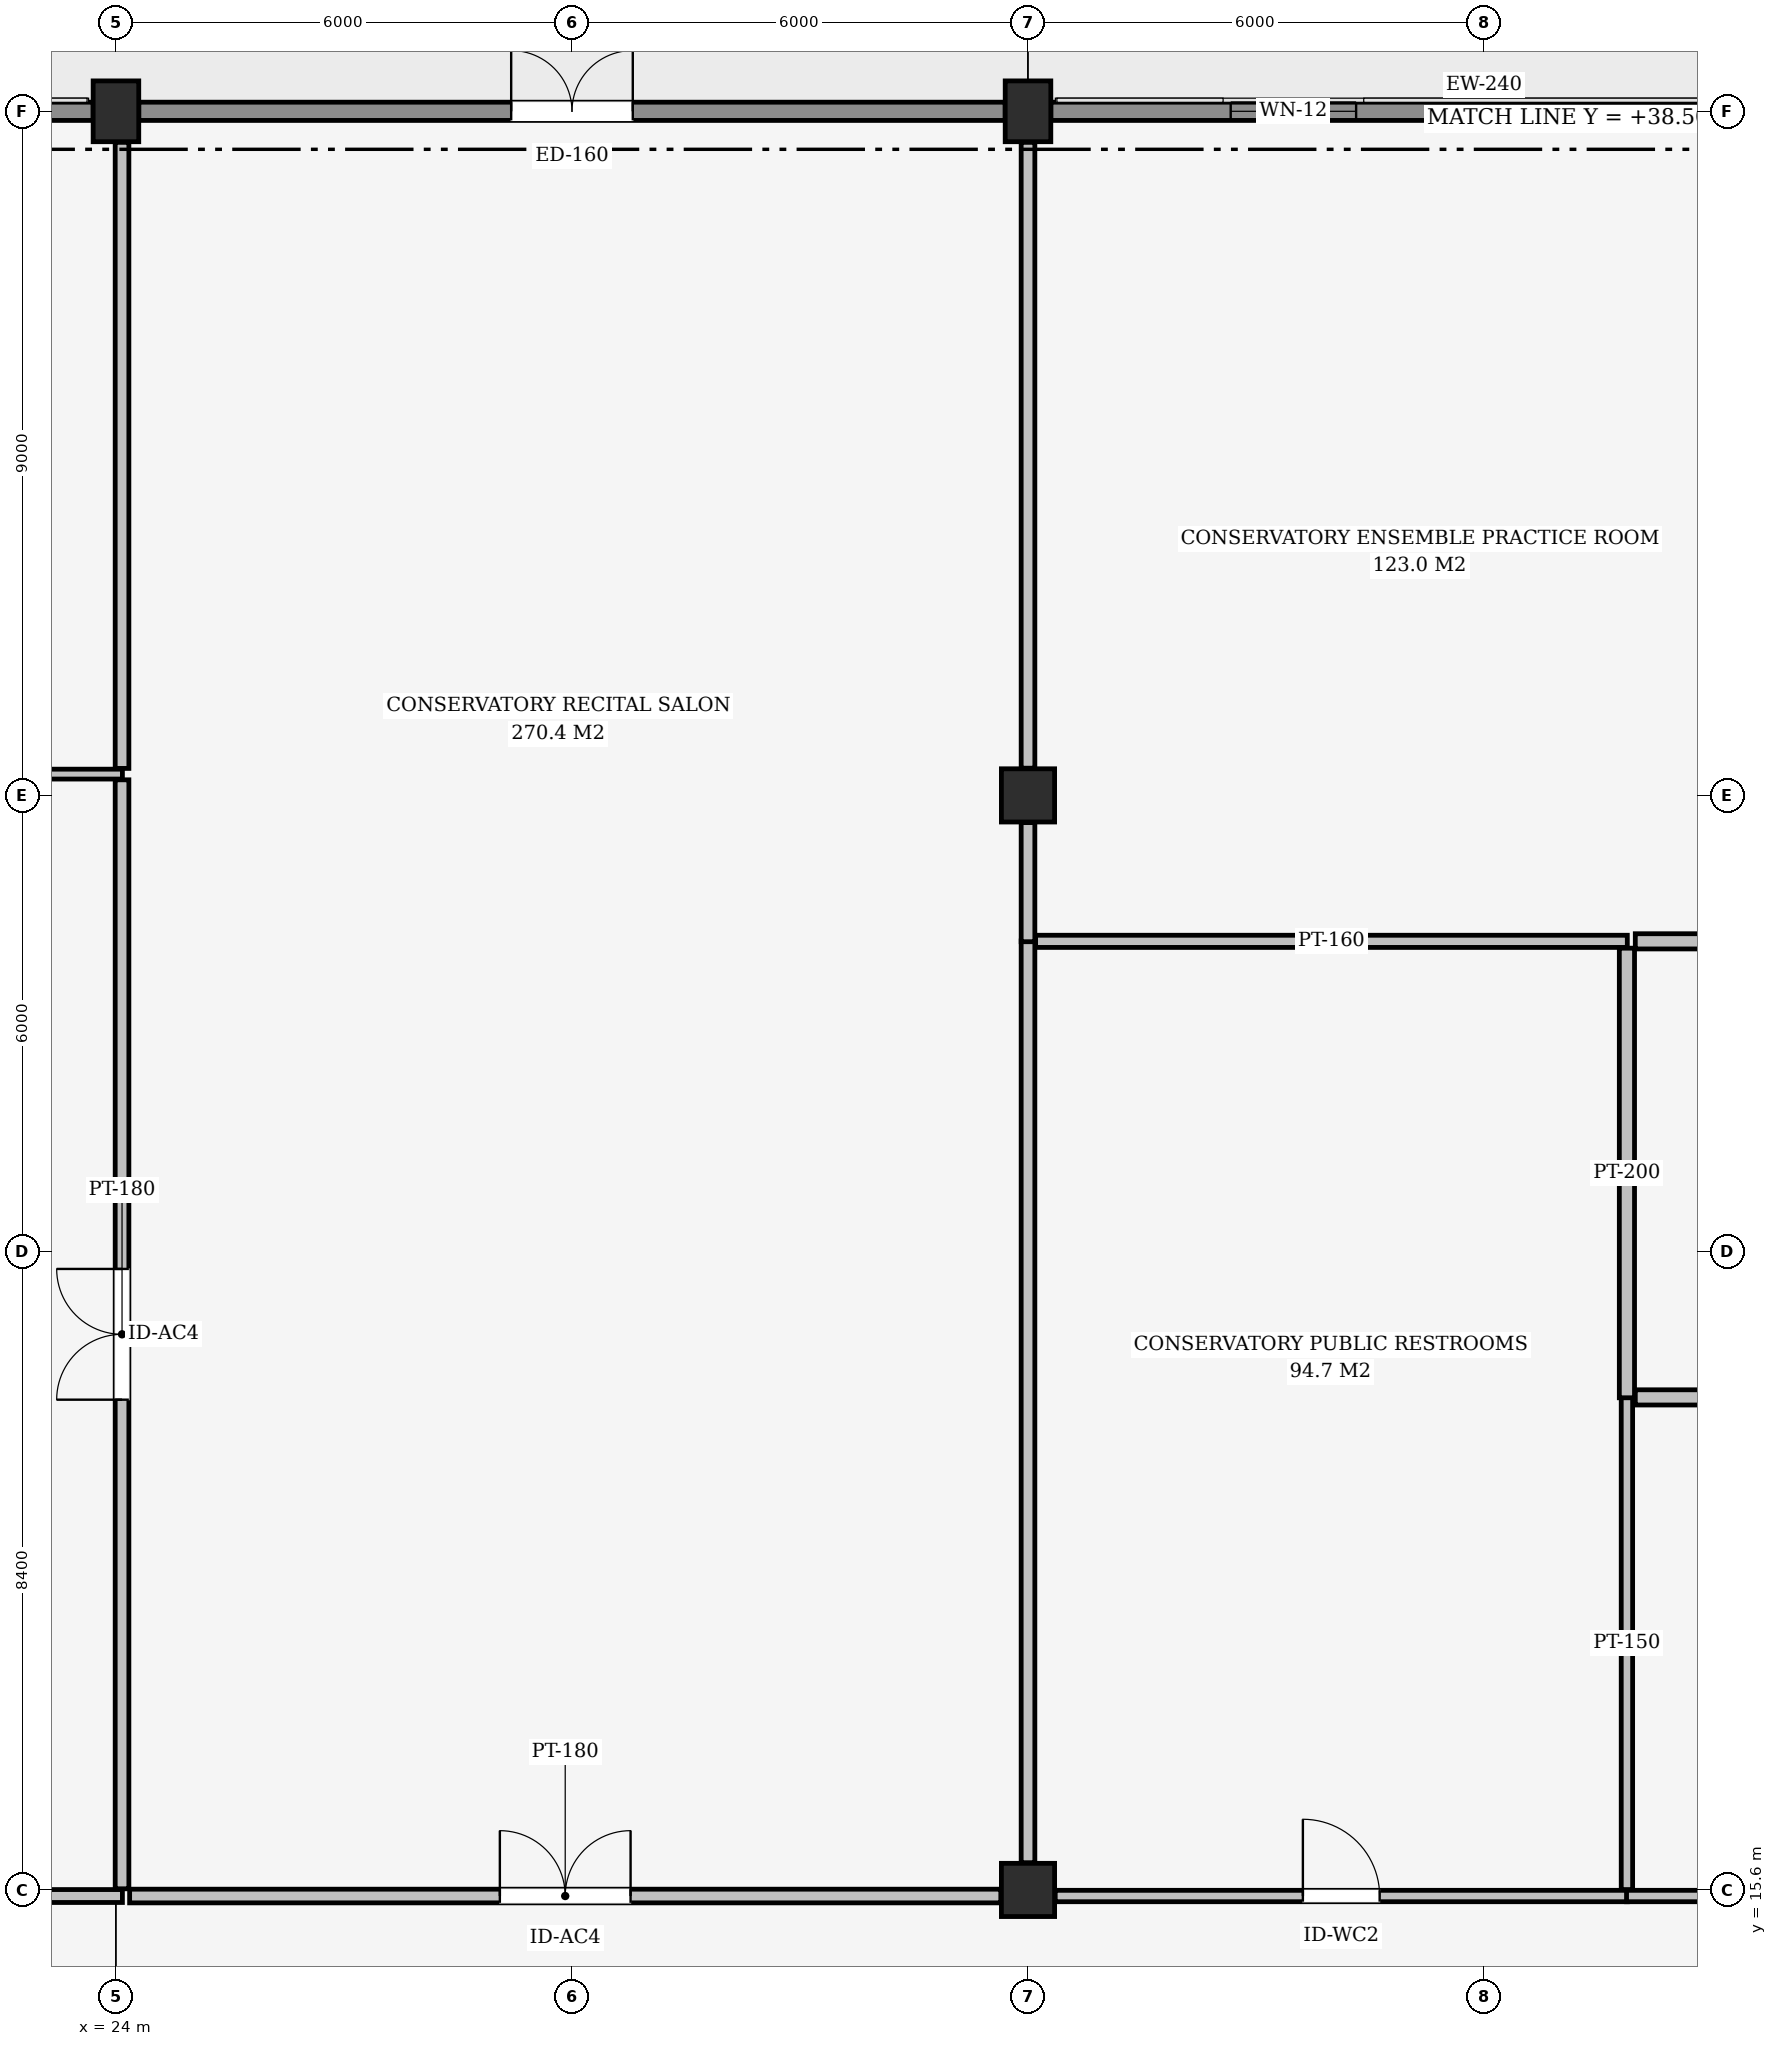
"""IFC4 building model, lengths in metres.
Left out: names, types, materials, properties, quantities, classifications, styles, units other than length and angle.
Written with IfcOpenShell. Run it as: python <this file> out.ifc"""

import sys

from ifc_helpers import new_model, si_unit, direction, frame, frame_2d, origin, origin_2d, place, context, subcontext, project, spatial, rectangle, extrude, element, fill, save


model = new_model("IFC4")
c1 = context("Model", 3, precision=1e-05, world=origin(), true_north=direction((0.0, 1.0)))
c2 = subcontext(c1, "Body", "Model", "MODEL_VIEW")
j1 = project(units=[si_unit("LENGTHUNIT", "METRE"), si_unit("PLANEANGLEUNIT", "RADIAN")], contexts=[c1])
p1 = place(None, origin())
s1 = spatial("IfcSite", under=j1, at=p1, CompositionType="ELEMENT")
p2 = place(p1, origin())
s2 = spatial("IfcBuilding", under=s1, at=p2, CompositionType="ELEMENT")
p3 = place(p2, frame((0.0, 0.0, 9.3)))
s3 = spatial("IfcBuildingStorey", under=s2, at=p3, CompositionType="ELEMENT", Elevation=9.3)
for number, where, z_axis, x_axis in (
    (1, (24.0, 39.0, 0.0), (0.0, 0.0, 1.0), (1.0, 0.0, 0.0)),
    (2, (36.0, 39.0, 0.0), (0.0, 0.0, 1.0), (1.0, 0.0, 0.0)),
):
    element("IfcColumn", number, at=place(p3, frame(where, z_axis=z_axis, x_axis=x_axis)), inside=s3, PredefinedType="COLUMN", context=c2, shape_type="SweptSolid", body=[
        extrude(rectangle(XDim=0.6, YDim=0.8, at=origin_2d()), origin(), (0.0, 0.0, 1.0), 4.5),
    ])
for number, where, z_axis, x_axis in (
    (3, (36.0, 15.6, 0.0), (0.0, 0.0, 1.0), (1.0, 0.0, 0.0)),
    (4, (36.0, 30.0, 0.0), (0.0, 0.0, 1.0), (1.0, 0.0, 0.0)),
):
    element("IfcColumn", number, at=place(p3, frame(where, z_axis=z_axis, x_axis=x_axis)), inside=s3, PredefinedType="COLUMN", context=c2, shape_type="SweptSolid", body=[
        extrude(rectangle(XDim=0.7, YDim=0.7, at=origin_2d()), origin(), (0.0, 0.0, 1.0), 4.5),
    ])
p4 = place(p3, frame((12.3, 39.0, 0.0), z_axis=(0.0, 0.0, 1.0), x_axis=(1.0, 0.0, 0.0)))
e5 = element("IfcWall", 5, at=p4, inside=s3, PredefinedType="SOLIDWALL", context=c2, shape_type="SweptSolid", body=[
    extrude(rectangle(XDim=11.4, YDim=0.24, at=frame_2d((5.7, 0.0))), origin(), (0.0, 0.0, 1.0), 3.873),
])
p5 = place(p4, frame((7.008, 0.0, 0.85)))
e6 = element("IfcOpeningElement", 6, at=p5, cuts=e5, PredefinedType="OPENING", context=c2, shape_type="SweptSolid", body=[
    extrude(rectangle(XDim=2.4, YDim=0.95, at=frame_2d((1.2, 0.475))), frame((0.0, 0.13, 0.0), z_axis=(0.0, -1.0, 0.0), x_axis=(1.0, 0.0, 0.0)), (0.0, 0.0, 1.0), 0.26),
])
p6 = place(p3, frame((24.3, 39.0, 0.0), z_axis=(0.0, 0.0, 1.0), x_axis=(1.0, 0.0, 0.0)))
e7 = element("IfcWall", 7, at=p6, inside=s3, PredefinedType="SOLIDWALL", context=c2, shape_type="SweptSolid", body=[
    extrude(rectangle(XDim=11.4, YDim=0.24, at=frame_2d((5.7, 0.0))), origin(), (0.0, 0.0, 1.0), 3.873),
])
p7 = place(p6, frame((4.9, 0.0, 0.0)))
e8 = element("IfcOpeningElement", 8, at=p7, cuts=e7, PredefinedType="OPENING", context=c2, shape_type="SweptSolid", body=[
    extrude(rectangle(XDim=1.6, YDim=2.3, at=frame_2d((0.8, 1.15))), frame((0.0, 0.13, 0.0), z_axis=(0.0, -1.0, 0.0), x_axis=(1.0, 0.0, 0.0)), (0.0, 0.0, 1.0), 0.26),
])
p8 = place(p3, frame((36.3, 39.0, 0.0), z_axis=(0.0, 0.0, 1.0), x_axis=(1.0, 0.0, 0.0)))
e9 = element("IfcWall", 9, at=p8, inside=s3, PredefinedType="SOLIDWALL", context=c2, shape_type="SweptSolid", body=[
    extrude(rectangle(XDim=11.4, YDim=0.24, at=frame_2d((5.7, 0.0))), origin(), (0.0, 0.0, 1.0), 3.873),
])
p9 = place(p8, frame((2.367, 0.0, 0.85)))
e10 = element("IfcOpeningElement", 10, at=p9, cuts=e9, PredefinedType="OPENING", context=c2, shape_type="SweptSolid", body=[
    extrude(rectangle(XDim=1.65, YDim=1.75, at=frame_2d((0.825, 0.875))), frame((0.0, 0.13, 0.0), z_axis=(0.0, -1.0, 0.0), x_axis=(1.0, 0.0, 0.0)), (0.0, 0.0, 1.0), 0.26),
])
p10 = place(p3, frame((12.358, 30.28, 0.0), z_axis=(0.0, 0.0, 1.0), x_axis=(1.0, 0.0, 0.0)))
e11 = element("IfcWall", 11, at=p10, inside=s3, PredefinedType="PARTITIONING", context=c2, shape_type="SweptSolid", body=[
    extrude(rectangle(XDim=11.727, YDim=0.13, at=frame_2d((5.864, 0.0))), origin(), (0.0, 0.0, 1.0), 3.18),
])
p11 = place(p10, frame((5.104, 0.0, 0.0)))
e12 = element("IfcOpeningElement", 12, at=p11, cuts=e11, PredefinedType="OPENING", context=c2, shape_type="SweptSolid", body=[
    extrude(rectangle(XDim=1.52, YDim=2.24, at=frame_2d((0.76, 1.12))), frame((0.0, 0.075, 0.0), z_axis=(0.0, -1.0, 0.0), x_axis=(1.0, 0.0, 0.0)), (0.0, 0.0, 1.0), 0.15),
])
p12 = place(p3, frame((17.95, 15.52, 0.0), z_axis=(0.0, 0.0, 1.0), x_axis=(1.0, 0.0, 0.0)))
e13 = element("IfcWall", 13, at=p12, inside=s3, PredefinedType="PARTITIONING", context=c2, shape_type="SweptSolid", body=[
    extrude(rectangle(XDim=6.135, YDim=0.17, at=frame_2d((3.067, 0.0))), origin(), (0.0, 0.0, 1.0), 3.18),
])
p13 = place(p12, frame((2.458, 0.0, 0.0)))
e14 = element("IfcOpeningElement", 14, at=p13, cuts=e13, PredefinedType="OPENING", context=c2, shape_type="SweptSolid", body=[
    extrude(rectangle(XDim=1.22, YDim=2.18, at=frame_2d((0.61, 1.09))), frame((0.0, 0.095, 0.0), z_axis=(0.0, -1.0, 0.0), x_axis=(1.0, 0.0, 0.0)), (0.0, 0.0, 1.0), 0.19),
])
p14 = place(p3, frame((24.08, 15.615, 0.0), z_axis=(0.0, 0.0, 1.0), x_axis=(0.0, 1.0, 0.0)))
e15 = element("IfcWall", 15, at=p14, inside=s3, PredefinedType="PARTITIONING", context=c2, shape_type="SweptSolid", body=[
    extrude(rectangle(XDim=14.59, YDim=0.18, at=frame_2d((7.295, 0.0))), origin(), (0.0, 0.0, 1.0), 3.944),
])
p15 = place(p14, frame((6.435, 0.0, 0.0)))
e16 = element("IfcOpeningElement", 16, at=p15, cuts=e15, PredefinedType="OPENING", context=c2, shape_type="SweptSolid", body=[
    extrude(rectangle(XDim=1.72, YDim=2.34, at=frame_2d((0.86, 1.17))), frame((0.0, 0.1, 0.0), z_axis=(0.0, -1.0, 0.0), x_axis=(1.0, 0.0, 0.0)), (0.0, 0.0, 1.0), 0.2),
])
p16 = place(p3, frame((24.08, 30.355, 0.0), z_axis=(0.0, 0.0, 1.0), x_axis=(0.0, 1.0, 0.0)))
e17 = element("IfcWall", 17, at=p16, inside=s3, PredefinedType="PARTITIONING", context=c2, shape_type="SweptSolid", body=[
    extrude(rectangle(XDim=8.237, YDim=0.18, at=frame_2d((4.119, 0.0))), origin(), (0.0, 0.0, 1.0), 3.944),
])
p17 = place(p3, frame((24.18, 15.52, 0.0), z_axis=(0.0, 0.0, 1.0), x_axis=(1.0, 0.0, 0.0)))
e18 = element("IfcWall", 18, at=p17, inside=s3, PredefinedType="PARTITIONING", context=c2, shape_type="SweptSolid", body=[
    extrude(rectangle(XDim=11.462, YDim=0.18, at=frame_2d((5.731, 0.0))), origin(), (0.0, 0.0, 1.0), 3.18),
])
p18 = place(p17, frame((4.871, 0.0, 0.0)))
e19 = element("IfcOpeningElement", 19, at=p18, cuts=e18, PredefinedType="OPENING", context=c2, shape_type="SweptSolid", body=[
    extrude(rectangle(XDim=1.72, YDim=2.34, at=frame_2d((0.86, 1.17))), frame((0.0, 0.1, 0.0), z_axis=(0.0, -1.0, 0.0), x_axis=(1.0, 0.0, 0.0)), (0.0, 0.0, 1.0), 0.2),
])
p19 = place(p3, frame((36.358, 15.52, 0.0), z_axis=(0.0, 0.0, 1.0), x_axis=(1.0, 0.0, 0.0)))
e20 = element("IfcWall", 20, at=p19, inside=s3, PredefinedType="PARTITIONING", context=c2, shape_type="SweptSolid", body=[
    extrude(rectangle(XDim=7.527, YDim=0.15, at=frame_2d((3.764, 0.0))), origin(), (0.0, 0.0, 1.0), 3.873),
])
p20 = place(p19, frame((3.259, 0.0, 0.0)))
e21 = element("IfcOpeningElement", 21, at=p20, cuts=e20, PredefinedType="OPENING", context=c2, shape_type="SweptSolid", body=[
    extrude(rectangle(XDim=1.01, YDim=2.1, at=frame_2d((0.505, 1.05))), frame((0.0, 0.085, 0.0), z_axis=(0.0, -1.0, 0.0), x_axis=(1.0, 0.0, 0.0)), (0.0, 0.0, 1.0), 0.17),
])
p21 = place(p3, frame((43.875, 15.52, 0.0), z_axis=(0.0, 0.0, 1.0), x_axis=(1.0, 0.0, 0.0)))
e22 = element("IfcWall", 22, at=p21, inside=s3, PredefinedType="PARTITIONING", context=c2, shape_type="SweptSolid", body=[
    extrude(rectangle(XDim=3.767, YDim=0.15, at=frame_2d((1.884, 0.0))), origin(), (0.0, 0.0, 1.0), 3.873),
])
p22 = place(p21, frame((1.414, 0.0, 0.0)))
e23 = element("IfcOpeningElement", 23, at=p22, cuts=e22, PredefinedType="OPENING", context=c2, shape_type="SweptSolid", body=[
    extrude(rectangle(XDim=0.94, YDim=2.1, at=frame_2d((0.47, 1.05))), frame((0.0, 0.085, 0.0), z_axis=(0.0, -1.0, 0.0), x_axis=(1.0, 0.0, 0.0)), (0.0, 0.0, 1.0), 0.17),
])
p23 = place(p3, frame((36.0, 15.958, 0.0), z_axis=(0.0, 0.0, 1.0), x_axis=(0.0, 1.0, 0.0)))
e24 = element("IfcWall", 24, at=p23, inside=s3, PredefinedType="PARTITIONING", context=c2, shape_type="SweptSolid", body=[
    extrude(rectangle(XDim=12.127, YDim=0.18, at=frame_2d((6.063, 0.0))), origin(), (0.0, 0.0, 1.0), 3.869),
])
p24 = place(p3, frame((36.0, 28.075, 0.0), z_axis=(0.0, 0.0, 1.0), x_axis=(0.0, 1.0, 0.0)))
e25 = element("IfcWall", 25, at=p24, inside=s3, PredefinedType="PARTITIONING", context=c2, shape_type="SweptSolid", body=[
    extrude(rectangle(XDim=1.567, YDim=0.18, at=frame_2d((0.784, 0.0))), origin(), (0.0, 0.0, 1.0), 3.869),
])
p25 = place(p3, frame((36.0, 30.358, 0.0), z_axis=(0.0, 0.0, 1.0), x_axis=(0.0, 1.0, 0.0)))
e26 = element("IfcWall", 26, at=p25, inside=s3, PredefinedType="PARTITIONING", context=c2, shape_type="SweptSolid", body=[
    extrude(rectangle(XDim=8.234, YDim=0.18, at=frame_2d((4.117, 0.0))), origin(), (0.0, 0.0, 1.0), 3.869),
])
p26 = place(p3, frame((43.88, 15.605, 0.0), z_axis=(0.0, 0.0, 1.0), x_axis=(0.0, 1.0, 0.0)))
e27 = element("IfcWall", 27, at=p26, inside=s3, PredefinedType="PARTITIONING", context=c2, shape_type="SweptSolid", body=[
    extrude(rectangle(XDim=6.48, YDim=0.15, at=frame_2d((3.24, 0.0))), origin(), (0.0, 0.0, 1.0), 4.5),
])
p27 = place(p3, frame((36.1, 28.08, 0.0), z_axis=(0.0, 0.0, 1.0), x_axis=(1.0, 0.0, 0.0)))
e28 = element("IfcWall", 28, at=p27, inside=s3, PredefinedType="PARTITIONING", context=c2, shape_type="SweptSolid", body=[
    extrude(rectangle(XDim=7.785, YDim=0.16, at=frame_2d((3.893, 0.0))), origin(), (0.0, 0.0, 1.0), 4.5),
])
p28 = place(p3, frame((43.88, 22.075, 0.0), z_axis=(0.0, 0.0, 1.0), x_axis=(0.0, 1.0, 0.0)))
e29 = element("IfcWall", 29, at=p28, inside=s3, PredefinedType="PARTITIONING", context=c2, shape_type="SweptSolid", body=[
    extrude(rectangle(XDim=5.915, YDim=0.2, at=frame_2d((2.958, 0.0))), origin(), (0.0, 0.0, 1.0), 4.5),
])
for number, where, z_axis, x_axis in (
    (30, (43.99, 22.08, 0.0), (0.0, 0.0, 1.0), (1.0, 0.0, 0.0)),
    (31, (43.99, 28.08, 0.0), (0.0, 0.0, 1.0), (1.0, 0.0, 0.0)),
):
    element("IfcWall", number, at=place(p3, frame(where, z_axis=z_axis, x_axis=x_axis)), inside=s3, PredefinedType="PARTITIONING", context=c2, shape_type="SweptSolid", body=[
        extrude(rectangle(XDim=3.96, YDim=0.2, at=frame_2d((1.98, 0.0))), origin(), (0.0, 0.0, 1.0), 4.5),
    ])
p29 = place(p7, origin())
e32 = element("IfcDoor", 32, at=p29, inside=s3, OperationType="DOUBLE_DOOR_SINGLE_SWING", PredefinedType="DOOR", context=c2, shape_type="SweptSolid", body=[
    extrude(rectangle(XDim=1.6, YDim=2.3, at=frame_2d((0.8, 1.15))), frame((0.0, 0.025, 0.0), z_axis=(0.0, -1.0, 0.0), x_axis=(1.0, 0.0, 0.0)), (0.0, 0.0, 1.0), 0.05),
])
fill(e8, e32)
p30 = place(p9, origin())
e33 = element("IfcWindow", 33, at=p30, inside=s3, PartitioningType="SINGLE_PANEL", PredefinedType="WINDOW", context=c2, shape_type="SweptSolid", body=[
    extrude(rectangle(XDim=1.65, YDim=1.75, at=frame_2d((0.825, 0.875))), frame((0.0, 0.03, 0.0), z_axis=(0.0, -1.0, 0.0), x_axis=(1.0, 0.0, 0.0)), (0.0, 0.0, 1.0), 0.06),
])
fill(e10, e33)
p31 = place(p15, origin())
e34 = element("IfcDoor", 34, at=p31, inside=s3, OperationType="DOUBLE_DOOR_SINGLE_SWING", PredefinedType="DOOR", context=c2, shape_type="SweptSolid", body=[
    extrude(rectangle(XDim=1.72, YDim=2.34, at=frame_2d((0.86, 1.17))), frame((0.0, 0.025, 0.0), z_axis=(0.0, -1.0, 0.0), x_axis=(1.0, 0.0, 0.0)), (0.0, 0.0, 1.0), 0.05),
])
fill(e16, e34)
p32 = place(p18, origin())
e35 = element("IfcDoor", 35, at=p32, inside=s3, OperationType="DOUBLE_DOOR_SINGLE_SWING", PredefinedType="DOOR", context=c2, shape_type="SweptSolid", body=[
    extrude(rectangle(XDim=1.72, YDim=2.34, at=frame_2d((0.86, 1.17))), frame((0.0, 0.025, 0.0), z_axis=(0.0, -1.0, 0.0), x_axis=(1.0, 0.0, 0.0)), (0.0, 0.0, 1.0), 0.05),
])
fill(e19, e35)
p33 = place(p20, origin())
e36 = element("IfcDoor", 36, at=p33, inside=s3, OperationType="SINGLE_SWING_LEFT", PredefinedType="DOOR", context=c2, shape_type="SweptSolid", body=[
    extrude(rectangle(XDim=1.01, YDim=2.1, at=frame_2d((0.505, 1.05))), frame((0.0, 0.025, 0.0), z_axis=(0.0, -1.0, 0.0), x_axis=(1.0, 0.0, 0.0)), (0.0, 0.0, 1.0), 0.05),
])
fill(e21, e36)
save(model, sys.argv[1])
